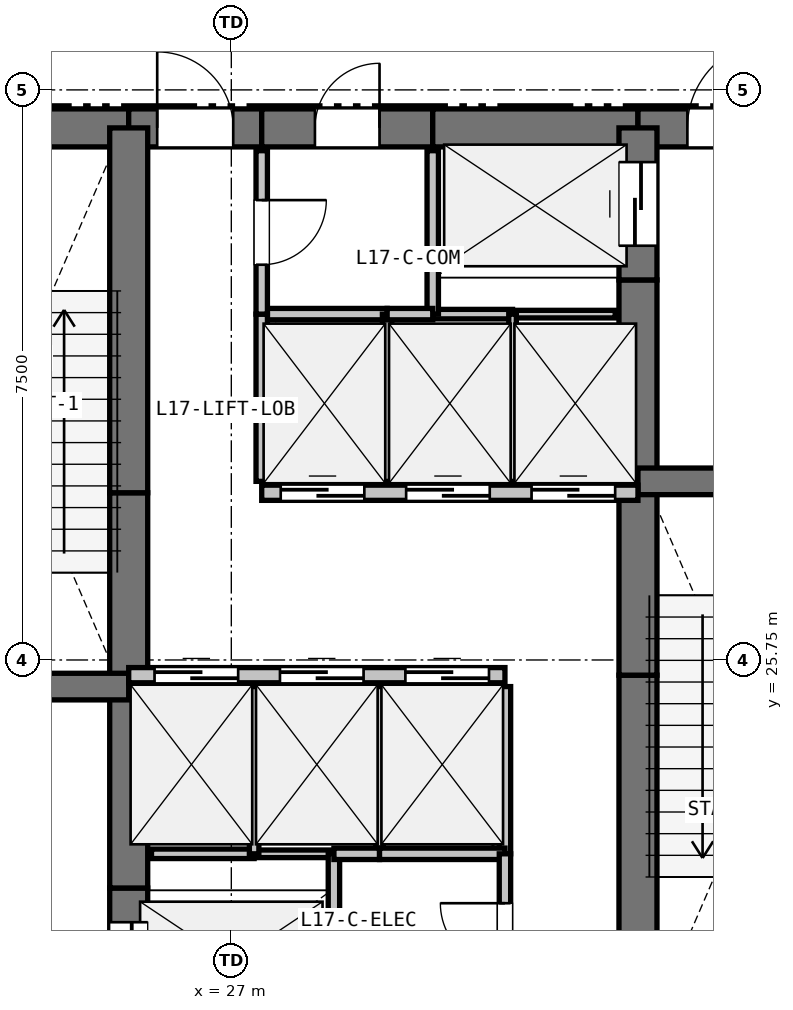
"""IFC4 building model, lengths in metres.
Left out: names, types, materials, properties, quantities, classifications, styles, units other than length and angle.
Written with IfcOpenShell. Run it as: python <this file> out.ifc"""

import sys

from ifc_helpers import new_model, si_unit, direction, frame, frame_2d, origin, place, context, subcontext, project, spatial, rectangle, extrude, element, fill, save


model = new_model("IFC4")
c1 = context("Model", 3, precision=1e-05, world=origin(), true_north=direction((0.0, 1.0)))
c2 = subcontext(c1, "Body", "Model", "MODEL_VIEW")
j1 = project(units=[si_unit("LENGTHUNIT", "METRE"), si_unit("PLANEANGLEUNIT", "RADIAN")], contexts=[c1])
p1 = place(None, origin())
s1 = spatial("IfcSite", under=j1, at=p1, CompositionType="ELEMENT")
p2 = place(p1, origin())
s2 = spatial("IfcBuilding", under=s1, at=p2, CompositionType="ELEMENT")
p3 = place(p2, frame((0.0, 0.0, 62.1)))
s3 = spatial("IfcBuildingStorey", under=s2, at=p3, CompositionType="ELEMENT", Elevation=62.1)
p4 = place(p3, frame((22.2, 32.75, 0.0), z_axis=(0.0, 0.0, 1.0), x_axis=(1.0, 0.0, 0.0)))
e1 = element("IfcWall", 1, at=p4, inside=s3, PredefinedType="SHEAR", context=c2, shape_type="SweptSolid", body=[
    extrude(rectangle(XDim=3.45, YDim=0.5, at=frame_2d((1.725, 0.0))), origin(), (0.0, 0.0, 1.0), 4.48),
])
p5 = place(p3, frame((25.65, 32.75, 0.0), z_axis=(0.0, 0.0, 1.0), x_axis=(1.0, 0.0, 0.0)))
e2 = element("IfcWall", 2, at=p5, inside=s3, PredefinedType="SHEAR", context=c2, shape_type="SweptSolid", body=[
    extrude(rectangle(XDim=1.75, YDim=0.5, at=frame_2d((0.875, 0.0))), origin(), (0.0, 0.0, 1.0), 4.48),
])
p6 = place(p5, frame((0.375, 0.0, 0.0)))
e3 = element("IfcOpeningElement", 3, at=p6, cuts=e2, PredefinedType="OPENING", context=c2, shape_type="SweptSolid", body=[
    extrude(rectangle(XDim=1.0, YDim=2.15, at=frame_2d((0.5, 1.075))), frame((0.0, 0.26, 0.0), z_axis=(0.0, -1.0, 0.0), x_axis=(1.0, 0.0, 0.0)), (0.0, 0.0, 1.0), 0.52),
])
p7 = place(p3, frame((27.4, 32.75, 0.0), z_axis=(0.0, 0.0, 1.0), x_axis=(1.0, 0.0, 0.0)))
e4 = element("IfcWall", 4, at=p7, inside=s3, PredefinedType="SHEAR", context=c2, shape_type="SweptSolid", body=[
    extrude(rectangle(XDim=2.25, YDim=0.5, at=frame_2d((1.125, 0.0))), origin(), (0.0, 0.0, 1.0), 4.48),
])
p8 = place(p7, frame((0.7, 0.0, 0.0)))
e5 = element("IfcOpeningElement", 5, at=p8, cuts=e4, PredefinedType="OPENING", context=c2, shape_type="SweptSolid", body=[
    extrude(rectangle(XDim=0.85, YDim=2.1, at=frame_2d((0.425, 1.05))), frame((0.0, 0.26, 0.0), z_axis=(0.0, -1.0, 0.0), x_axis=(1.0, 0.0, 0.0)), (0.0, 0.0, 1.0), 0.52),
])
p9 = place(p3, frame((29.65, 32.75, 0.0), z_axis=(0.0, 0.0, 1.0), x_axis=(1.0, 0.0, 0.0)))
e6 = element("IfcWall", 6, at=p9, inside=s3, PredefinedType="SHEAR", context=c2, shape_type="SweptSolid", body=[
    extrude(rectangle(XDim=2.7, YDim=0.5, at=frame_2d((1.35, 0.0))), origin(), (0.0, 0.0, 1.0), 4.48),
])
p10 = place(p3, frame((32.35, 32.75, 0.0), z_axis=(0.0, 0.0, 1.0), x_axis=(1.0, 0.0, 0.0)))
e7 = element("IfcWall", 7, at=p10, inside=s3, PredefinedType="SHEAR", context=c2, shape_type="SweptSolid", body=[
    extrude(rectangle(XDim=3.45, YDim=0.5, at=frame_2d((1.725, 0.0))), origin(), (0.0, 0.0, 1.0), 4.48),
])
p11 = place(p10, frame((0.65, 0.0, 0.0)))
e8 = element("IfcOpeningElement", 8, at=p11, cuts=e7, PredefinedType="OPENING", context=c2, shape_type="SweptSolid", body=[
    extrude(rectangle(XDim=1.15, YDim=2.15, at=frame_2d((0.575, 1.075))), frame((0.0, 0.26, 0.0), z_axis=(0.0, -1.0, 0.0), x_axis=(1.0, 0.0, 0.0)), (0.0, 0.0, 1.0), 0.52),
])
p12 = place(p3, frame((25.65, 20.75, 0.0), z_axis=(0.0, 0.0, 1.0), x_axis=(0.0, 1.0, 0.0)))
e9 = element("IfcWall", 9, at=p12, inside=s3, PredefinedType="SHEAR", context=c2, shape_type="SweptSolid", body=[
    extrude(rectangle(XDim=2.0, YDim=0.5, at=frame_2d((1.0, 0.0))), origin(), (0.0, 0.0, 1.0), 4.48),
])
p13 = place(p12, frame((0.45, 0.0, 0.0)))
e10 = element("IfcOpeningElement", 10, at=p13, cuts=e9, PredefinedType="OPENING", context=c2, shape_type="SweptSolid", body=[
    extrude(rectangle(XDim=1.1, YDim=2.15, at=frame_2d((0.55, 1.075))), frame((0.0, 0.26, 0.0), z_axis=(0.0, -1.0, 0.0), x_axis=(1.0, 0.0, 0.0)), (0.0, 0.0, 1.0), 0.52),
])
p14 = place(p3, frame((25.65, 22.75, 0.0), z_axis=(0.0, 0.0, 1.0), x_axis=(0.0, 1.0, 0.0)))
e11 = element("IfcWall", 11, at=p14, inside=s3, PredefinedType="SHEAR", context=c2, shape_type="SweptSolid", body=[
    extrude(rectangle(XDim=2.8, YDim=0.5, at=frame_2d((1.4, 0.0))), origin(), (0.0, 0.0, 1.0), 4.48),
])
p15 = place(p3, frame((25.65, 25.55, 0.0), z_axis=(0.0, 0.0, 1.0), x_axis=(0.0, 1.0, 0.0)))
e12 = element("IfcWall", 12, at=p15, inside=s3, PredefinedType="SHEAR", context=c2, shape_type="SweptSolid", body=[
    extrude(rectangle(XDim=2.4, YDim=0.5, at=frame_2d((1.2, 0.0))), origin(), (0.0, 0.0, 1.0), 4.48),
])
for number, where, z_axis, x_axis in (
    (13, (25.65, 27.95, 0.0), (0.0, 0.0, 1.0), (0.0, 1.0, 0.0)),
    (14, (32.35, 20.75, 0.0), (0.0, 0.0, 1.0), (0.0, 1.0, 0.0)),
):
    element("IfcWall", number, at=place(p3, frame(where, z_axis=z_axis, x_axis=x_axis)), inside=s3, PredefinedType="SHEAR", context=c2, shape_type="SweptSolid", body=[
        extrude(rectangle(XDim=4.8, YDim=0.5, at=frame_2d((2.4, 0.0))), origin(), (0.0, 0.0, 1.0), 4.48),
    ])
p16 = place(p3, frame((32.35, 25.55, 0.0), z_axis=(0.0, 0.0, 1.0), x_axis=(0.0, 1.0, 0.0)))
e15 = element("IfcWall", 15, at=p16, inside=s3, PredefinedType="SHEAR", context=c2, shape_type="SweptSolid", body=[
    extrude(rectangle(XDim=2.4, YDim=0.5, at=frame_2d((1.2, 0.0))), origin(), (0.0, 0.0, 1.0), 4.48),
])
p17 = place(p3, frame((32.35, 27.95, 0.0), z_axis=(0.0, 0.0, 1.0), x_axis=(0.0, 1.0, 0.0)))
e16 = element("IfcWall", 16, at=p17, inside=s3, PredefinedType="SHEAR", context=c2, shape_type="SweptSolid", body=[
    extrude(rectangle(XDim=2.8, YDim=0.5, at=frame_2d((1.4, 0.0))), origin(), (0.0, 0.0, 1.0), 4.48),
])
p18 = place(p3, frame((32.35, 30.75, 0.0), z_axis=(0.0, 0.0, 1.0), x_axis=(0.0, 1.0, 0.0)))
e17 = element("IfcWall", 17, at=p18, inside=s3, PredefinedType="SHEAR", context=c2, shape_type="SweptSolid", body=[
    extrude(rectangle(XDim=2.0, YDim=0.5, at=frame_2d((1.0, 0.0))), origin(), (0.0, 0.0, 1.0), 4.48),
])
p19 = place(p18, frame((0.45, 0.0, 0.0)))
e18 = element("IfcOpeningElement", 18, at=p19, cuts=e17, PredefinedType="OPENING", context=c2, shape_type="SweptSolid", body=[
    extrude(rectangle(XDim=1.1, YDim=2.15, at=frame_2d((0.55, 1.075))), frame((0.0, 0.26, 0.0), z_axis=(0.0, -1.0, 0.0), x_axis=(1.0, 0.0, 0.0)), (0.0, 0.0, 1.0), 0.52),
])
p20 = place(p3, frame((22.2, 25.4, 0.0), z_axis=(0.0, 0.0, 1.0), x_axis=(1.0, 0.0, 0.0)))
e19 = element("IfcWall", 19, at=p20, inside=s3, PredefinedType="SHEAR", context=c2, shape_type="SweptSolid", body=[
    extrude(rectangle(XDim=3.45, YDim=0.35, at=frame_2d((1.725, 0.0))), origin(), (0.0, 0.0, 1.0), 4.48),
])
p21 = place(p20, frame((1.15, 0.0, 0.0)))
e20 = element("IfcOpeningElement", 20, at=p21, cuts=e19, PredefinedType="OPENING", context=c2, shape_type="SweptSolid", body=[
    extrude(rectangle(XDim=1.15, YDim=2.15, at=frame_2d((0.575, 1.075))), frame((0.0, 0.185, 0.0), z_axis=(0.0, -1.0, 0.0), x_axis=(1.0, 0.0, 0.0)), (0.0, 0.0, 1.0), 0.37),
])
p22 = place(p3, frame((32.35, 28.1, 0.0), z_axis=(0.0, 0.0, 1.0), x_axis=(1.0, 0.0, 0.0)))
e21 = element("IfcWall", 21, at=p22, inside=s3, PredefinedType="SHEAR", context=c2, shape_type="SweptSolid", body=[
    extrude(rectangle(XDim=3.45, YDim=0.35, at=frame_2d((1.725, 0.0))), origin(), (0.0, 0.0, 1.0), 4.48),
])
p23 = place(p22, frame((1.15, 0.0, 0.0)))
e22 = element("IfcOpeningElement", 22, at=p23, cuts=e21, PredefinedType="OPENING", context=c2, shape_type="SweptSolid", body=[
    extrude(rectangle(XDim=1.15, YDim=2.15, at=frame_2d((0.575, 1.075))), frame((0.0, 0.185, 0.0), z_axis=(0.0, -1.0, 0.0), x_axis=(1.0, 0.0, 0.0)), (0.0, 0.0, 1.0), 0.37),
])
p24 = place(p3, frame((25.65, 25.55, 0.0), z_axis=(0.0, 0.0, 1.0), x_axis=(1.0, 0.0, 0.0)))
e23 = element("IfcWall", 23, at=p24, inside=s3, PredefinedType="PARTITIONING", context=c2, shape_type="SweptSolid", body=[
    extrude(rectangle(XDim=4.95, YDim=0.2, at=frame_2d((2.475, 0.0))), origin(), (0.0, 0.0, 1.0), 4.48),
])
p25 = place(p24, frame((0.34, 0.0, 0.0)))
e24 = element("IfcOpeningElement", 24, at=p25, cuts=e23, PredefinedType="OPENING", context=c2, shape_type="SweptSolid", body=[
    extrude(rectangle(XDim=1.1, YDim=2.15, at=frame_2d((0.55, 1.075))), frame((0.0, 0.11, 0.0), z_axis=(0.0, -1.0, 0.0), x_axis=(1.0, 0.0, 0.0)), (0.0, 0.0, 1.0), 0.22),
])
p26 = place(p24, frame((1.99, 0.0, 0.0)))
e25 = element("IfcOpeningElement", 25, at=p26, cuts=e23, PredefinedType="OPENING", context=c2, shape_type="SweptSolid", body=[
    extrude(rectangle(XDim=1.1, YDim=2.15, at=frame_2d((0.55, 1.075))), frame((0.0, 0.11, 0.0), z_axis=(0.0, -1.0, 0.0), x_axis=(1.0, 0.0, 0.0)), (0.0, 0.0, 1.0), 0.22),
])
p27 = place(p24, frame((3.64, 0.0, 0.0)))
e26 = element("IfcOpeningElement", 26, at=p27, cuts=e23, PredefinedType="OPENING", context=c2, shape_type="SweptSolid", body=[
    extrude(rectangle(XDim=1.1, YDim=2.15, at=frame_2d((0.55, 1.075))), frame((0.0, 0.11, 0.0), z_axis=(0.0, -1.0, 0.0), x_axis=(1.0, 0.0, 0.0)), (0.0, 0.0, 1.0), 0.22),
])
p28 = place(p3, frame((27.4, 27.95, 0.0), z_axis=(0.0, 0.0, 1.0), x_axis=(1.0, 0.0, 0.0)))
e27 = element("IfcWall", 27, at=p28, inside=s3, PredefinedType="PARTITIONING", context=c2, shape_type="SweptSolid", body=[
    extrude(rectangle(XDim=4.95, YDim=0.2, at=frame_2d((2.475, 0.0))), origin(), (0.0, 0.0, 1.0), 4.48),
])
p29 = place(p28, frame((0.25, 0.0, 0.0)))
e28 = element("IfcOpeningElement", 28, at=p29, cuts=e27, PredefinedType="OPENING", context=c2, shape_type="SweptSolid", body=[
    extrude(rectangle(XDim=1.1, YDim=2.15, at=frame_2d((0.55, 1.075))), frame((0.0, 0.11, 0.0), z_axis=(0.0, -1.0, 0.0), x_axis=(1.0, 0.0, 0.0)), (0.0, 0.0, 1.0), 0.22),
])
p30 = place(p28, frame((1.9, 0.0, 0.0)))
e29 = element("IfcOpeningElement", 29, at=p30, cuts=e27, PredefinedType="OPENING", context=c2, shape_type="SweptSolid", body=[
    extrude(rectangle(XDim=1.1, YDim=2.15, at=frame_2d((0.55, 1.075))), frame((0.0, 0.11, 0.0), z_axis=(0.0, -1.0, 0.0), x_axis=(1.0, 0.0, 0.0)), (0.0, 0.0, 1.0), 0.22),
])
p31 = place(p28, frame((3.55, 0.0, 0.0)))
e30 = element("IfcOpeningElement", 30, at=p31, cuts=e27, PredefinedType="OPENING", context=c2, shape_type="SweptSolid", body=[
    extrude(rectangle(XDim=1.1, YDim=2.15, at=frame_2d((0.55, 1.075))), frame((0.0, 0.11, 0.0), z_axis=(0.0, -1.0, 0.0), x_axis=(1.0, 0.0, 0.0)), (0.0, 0.0, 1.0), 0.22),
])
p32 = place(p3, frame((25.95, 23.2, 0.0), z_axis=(0.0, 0.0, 1.0), x_axis=(1.0, 0.0, 0.0)))
e31 = element("IfcWall", 31, at=p32, inside=s3, PredefinedType="PARTITIONING", context=c2, shape_type="SweptSolid", body=[
    extrude(rectangle(XDim=1.35, YDim=0.125, at=frame_2d((0.675, 0.0))), origin(), (0.0, 0.0, 1.0), 4.48),
])
p33 = place(p3, frame((27.3, 23.2, 0.0), z_axis=(0.0, 0.0, 1.0), x_axis=(1.0, 0.0, 0.0)))
e32 = element("IfcWall", 32, at=p33, inside=s3, PredefinedType="PARTITIONING", context=c2, shape_type="SweptSolid", body=[
    extrude(rectangle(XDim=1.05, YDim=0.1, at=frame_2d((0.525, 0.0))), origin(), (0.0, 0.0, 1.0), 4.48),
])
p34 = place(p3, frame((28.35, 23.2, 0.0), z_axis=(0.0, 0.0, 1.0), x_axis=(0.0, -1.0, 0.0)))
e33 = element("IfcWall", 33, at=p34, inside=s3, PredefinedType="PARTITIONING", context=c2, shape_type="SweptSolid", body=[
    extrude(rectangle(XDim=2.15, YDim=0.15, at=frame_2d((1.075, 0.0))), origin(), (0.0, 0.0, 1.0), 4.48),
])
p35 = place(p3, frame((32.05, 30.3, 0.0), z_axis=(0.0, 0.0, 1.0), x_axis=(-1.0, 0.0, 0.0)))
e34 = element("IfcWall", 34, at=p35, inside=s3, PredefinedType="PARTITIONING", context=c2, shape_type="SweptSolid", body=[
    extrude(rectangle(XDim=1.35, YDim=0.1, at=frame_2d((0.675, 0.0))), origin(), (0.0, 0.0, 1.0), 4.48),
])
p36 = place(p3, frame((30.7, 30.3, 0.0), z_axis=(0.0, 0.0, 1.0), x_axis=(-1.0, 0.0, 0.0)))
e35 = element("IfcWall", 35, at=p36, inside=s3, PredefinedType="PARTITIONING", context=c2, shape_type="SweptSolid", body=[
    extrude(rectangle(XDim=1.05, YDim=0.125, at=frame_2d((0.525, 0.0))), origin(), (0.0, 0.0, 1.0), 4.48),
])
p37 = place(p3, frame((29.65, 30.3, 0.0), z_axis=(0.0, 0.0, 1.0), x_axis=(0.0, 1.0, 0.0)))
e36 = element("IfcWall", 36, at=p37, inside=s3, PredefinedType="PARTITIONING", context=c2, shape_type="SweptSolid", body=[
    extrude(rectangle(XDim=2.15, YDim=0.15, at=frame_2d((1.075, 0.0))), origin(), (0.0, 0.0, 1.0), 4.48),
])
p38 = place(p3, frame((27.3, 25.4, 0.0), z_axis=(0.0, 0.0, 1.0), x_axis=(0.0, -1.0, 0.0)))
e37 = element("IfcWall", 37, at=p38, inside=s3, PredefinedType="PARTITIONING", context=c2, shape_type="SweptSolid", body=[
    extrude(rectangle(XDim=2.2, YDim=0.125, at=frame_2d((1.1, 0.0))), origin(), (0.0, 0.0, 1.0), 4.48),
])
p39 = place(p3, frame((28.95, 25.4, 0.0), z_axis=(0.0, 0.0, 1.0), x_axis=(0.0, -1.0, 0.0)))
e38 = element("IfcWall", 38, at=p39, inside=s3, PredefinedType="PARTITIONING", context=c2, shape_type="SweptSolid", body=[
    extrude(rectangle(XDim=2.2, YDim=0.1, at=frame_2d((1.1, 0.0))), origin(), (0.0, 0.0, 1.0), 4.48),
])
p40 = place(p3, frame((28.95, 23.2, 0.0), z_axis=(0.0, 0.0, 1.0), x_axis=(-1.0, 0.0, 0.0)))
e39 = element("IfcWall", 39, at=p40, inside=s3, PredefinedType="PARTITIONING", context=c2, shape_type="SweptSolid", body=[
    extrude(rectangle(XDim=0.6, YDim=0.15, at=frame_2d((0.3, 0.0))), origin(), (0.0, 0.0, 1.0), 4.48),
])
p41 = place(p3, frame((30.6, 25.4, 0.0), z_axis=(0.0, 0.0, 1.0), x_axis=(0.0, -1.0, 0.0)))
e40 = element("IfcWall", 40, at=p41, inside=s3, PredefinedType="PARTITIONING", context=c2, shape_type="SweptSolid", body=[
    extrude(rectangle(XDim=2.2, YDim=0.15, at=frame_2d((1.1, 0.0))), origin(), (0.0, 0.0, 1.0), 4.48),
])
for number, where, z_axis, x_axis in (
    (41, (30.6, 23.2, 0.0), (0.0, 0.0, 1.0), (-1.0, 0.0, 0.0)),
    (42, (27.4, 30.3, 0.0), (0.0, 0.0, 1.0), (1.0, 0.0, 0.0)),
):
    element("IfcWall", number, at=place(p3, frame(where, z_axis=z_axis, x_axis=x_axis)), inside=s3, PredefinedType="PARTITIONING", context=c2, shape_type="SweptSolid", body=[
        extrude(rectangle(XDim=1.65, YDim=0.15, at=frame_2d((0.825, 0.0))), origin(), (0.0, 0.0, 1.0), 4.48),
    ])
p42 = place(p3, frame((29.05, 30.3, 0.0), z_axis=(0.0, 0.0, 1.0), x_axis=(0.0, -1.0, 0.0)))
e43 = element("IfcWall", 43, at=p42, inside=s3, PredefinedType="PARTITIONING", context=c2, shape_type="SweptSolid", body=[
    extrude(rectangle(XDim=2.2, YDim=0.125, at=frame_2d((1.1, 0.0))), origin(), (0.0, 0.0, 1.0), 4.48),
])
p43 = place(p3, frame((27.4, 28.1, 0.0), z_axis=(0.0, 0.0, 1.0), x_axis=(0.0, 1.0, 0.0)))
e44 = element("IfcWall", 44, at=p43, inside=s3, PredefinedType="PARTITIONING", context=c2, shape_type="SweptSolid", body=[
    extrude(rectangle(XDim=2.2, YDim=0.15, at=frame_2d((1.1, 0.0))), origin(), (0.0, 0.0, 1.0), 4.48),
])
p44 = place(p3, frame((29.05, 30.3, 0.0), z_axis=(0.0, 0.0, 1.0), x_axis=(1.0, 0.0, 0.0)))
e45 = element("IfcWall", 45, at=p44, inside=s3, PredefinedType="PARTITIONING", context=c2, shape_type="SweptSolid", body=[
    extrude(rectangle(XDim=0.6, YDim=0.15, at=frame_2d((0.3, 0.0))), origin(), (0.0, 0.0, 1.0), 4.48),
])
p45 = place(p3, frame((30.7, 30.3, 0.0), z_axis=(0.0, 0.0, 1.0), x_axis=(0.0, -1.0, 0.0)))
e46 = element("IfcWall", 46, at=p45, inside=s3, PredefinedType="PARTITIONING", context=c2, shape_type="SweptSolid", body=[
    extrude(rectangle(XDim=2.2, YDim=0.1, at=frame_2d((1.1, 0.0))), origin(), (0.0, 0.0, 1.0), 4.48),
])
p46 = place(p3, frame((30.6, 21.05, 0.0), z_axis=(0.0, 0.0, 1.0), x_axis=(0.0, 1.0, 0.0)))
e47 = element("IfcWall", 47, at=p46, inside=s3, PredefinedType="PARTITIONING", context=c2, shape_type="SweptSolid", body=[
    extrude(rectangle(XDim=2.15, YDim=0.15, at=frame_2d((1.075, 0.0))), origin(), (0.0, 0.0, 1.0), 4.48),
])
p47 = place(p46, frame((0.65, 0.0, 0.0)))
e48 = element("IfcOpeningElement", 48, at=p47, cuts=e47, PredefinedType="OPENING", context=c2, shape_type="SweptSolid", body=[
    extrude(rectangle(XDim=0.85, YDim=2.1, at=frame_2d((0.425, 1.05))), frame((0.0, 0.085, 0.0), z_axis=(0.0, -1.0, 0.0), x_axis=(1.0, 0.0, 0.0)), (0.0, 0.0, 1.0), 0.17),
])
p48 = place(p3, frame((27.4, 32.45, 0.0), z_axis=(0.0, 0.0, 1.0), x_axis=(0.0, -1.0, 0.0)))
e49 = element("IfcWall", 49, at=p48, inside=s3, PredefinedType="PARTITIONING", context=c2, shape_type="SweptSolid", body=[
    extrude(rectangle(XDim=2.15, YDim=0.15, at=frame_2d((1.075, 0.0))), origin(), (0.0, 0.0, 1.0), 4.48),
])
p49 = place(p48, frame((0.65, 0.0, 0.0)))
e50 = element("IfcOpeningElement", 50, at=p49, cuts=e49, PredefinedType="OPENING", context=c2, shape_type="SweptSolid", body=[
    extrude(rectangle(XDim=0.85, YDim=2.1, at=frame_2d((0.425, 1.05))), frame((0.0, 0.085, 0.0), z_axis=(0.0, -1.0, 0.0), x_axis=(1.0, 0.0, 0.0)), (0.0, 0.0, 1.0), 0.17),
])
p50 = place(p25, origin())
e51 = element("IfcDoor", 51, at=p50, inside=s3, OperationType="SLIDING_TO_LEFT", PredefinedType="DOOR", context=c2, shape_type="SweptSolid", body=[
    extrude(rectangle(XDim=1.1, YDim=2.15, at=frame_2d((0.55, 1.075))), frame((0.0, 0.025, 0.0), z_axis=(0.0, -1.0, 0.0), x_axis=(1.0, 0.0, 0.0)), (0.0, 0.0, 1.0), 0.05),
])
fill(e24, e51)
p51 = place(p26, origin())
e52 = element("IfcDoor", 52, at=p51, inside=s3, OperationType="SLIDING_TO_LEFT", PredefinedType="DOOR", context=c2, shape_type="SweptSolid", body=[
    extrude(rectangle(XDim=1.1, YDim=2.15, at=frame_2d((0.55, 1.075))), frame((0.0, 0.025, 0.0), z_axis=(0.0, -1.0, 0.0), x_axis=(1.0, 0.0, 0.0)), (0.0, 0.0, 1.0), 0.05),
])
fill(e25, e52)
p52 = place(p27, origin())
e53 = element("IfcDoor", 53, at=p52, inside=s3, OperationType="SLIDING_TO_LEFT", PredefinedType="DOOR", context=c2, shape_type="SweptSolid", body=[
    extrude(rectangle(XDim=1.1, YDim=2.15, at=frame_2d((0.55, 1.075))), frame((0.0, 0.025, 0.0), z_axis=(0.0, -1.0, 0.0), x_axis=(1.0, 0.0, 0.0)), (0.0, 0.0, 1.0), 0.05),
])
fill(e26, e53)
p53 = place(p29, origin())
e54 = element("IfcDoor", 54, at=p53, inside=s3, OperationType="SLIDING_TO_LEFT", PredefinedType="DOOR", context=c2, shape_type="SweptSolid", body=[
    extrude(rectangle(XDim=1.1, YDim=2.15, at=frame_2d((0.55, 1.075))), frame((0.0, 0.025, 0.0), z_axis=(0.0, -1.0, 0.0), x_axis=(1.0, 0.0, 0.0)), (0.0, 0.0, 1.0), 0.05),
])
fill(e28, e54)
p54 = place(p30, origin())
e55 = element("IfcDoor", 55, at=p54, inside=s3, OperationType="SLIDING_TO_LEFT", PredefinedType="DOOR", context=c2, shape_type="SweptSolid", body=[
    extrude(rectangle(XDim=1.1, YDim=2.15, at=frame_2d((0.55, 1.075))), frame((0.0, 0.025, 0.0), z_axis=(0.0, -1.0, 0.0), x_axis=(1.0, 0.0, 0.0)), (0.0, 0.0, 1.0), 0.05),
])
fill(e29, e55)
p55 = place(p31, origin())
e56 = element("IfcDoor", 56, at=p55, inside=s3, OperationType="SLIDING_TO_LEFT", PredefinedType="DOOR", context=c2, shape_type="SweptSolid", body=[
    extrude(rectangle(XDim=1.1, YDim=2.15, at=frame_2d((0.55, 1.075))), frame((0.0, 0.025, 0.0), z_axis=(0.0, -1.0, 0.0), x_axis=(1.0, 0.0, 0.0)), (0.0, 0.0, 1.0), 0.05),
])
fill(e30, e56)
p56 = place(p6, origin())
e57 = element("IfcDoor", 57, at=p56, inside=s3, OperationType="SINGLE_SWING_LEFT", PredefinedType="DOOR", context=c2, shape_type="SweptSolid", body=[
    extrude(rectangle(XDim=1.0, YDim=2.15, at=frame_2d((0.5, 1.075))), frame((0.0, 0.025, 0.0), z_axis=(0.0, -1.0, 0.0), x_axis=(1.0, 0.0, 0.0)), (0.0, 0.0, 1.0), 0.05),
])
fill(e3, e57)
p57 = place(p13, origin())
e58 = element("IfcDoor", 58, at=p57, inside=s3, OperationType="SLIDING_TO_LEFT", PredefinedType="DOOR", context=c2, shape_type="SweptSolid", body=[
    extrude(rectangle(XDim=1.1, YDim=2.15, at=frame_2d((0.55, 1.075))), frame((0.0, 0.025, 0.0), z_axis=(0.0, -1.0, 0.0), x_axis=(1.0, 0.0, 0.0)), (0.0, 0.0, 1.0), 0.05),
])
fill(e10, e58)
p58 = place(p19, origin())
e59 = element("IfcDoor", 59, at=p58, inside=s3, OperationType="SLIDING_TO_LEFT", PredefinedType="DOOR", context=c2, shape_type="SweptSolid", body=[
    extrude(rectangle(XDim=1.1, YDim=2.15, at=frame_2d((0.55, 1.075))), frame((0.0, 0.025, 0.0), z_axis=(0.0, -1.0, 0.0), x_axis=(1.0, 0.0, 0.0)), (0.0, 0.0, 1.0), 0.05),
])
fill(e18, e59)
p59 = place(p11, origin())
e60 = element("IfcDoor", 60, at=p59, inside=s3, OperationType="SINGLE_SWING_RIGHT", PredefinedType="DOOR", context=c2, shape_type="SweptSolid", body=[
    extrude(rectangle(XDim=1.15, YDim=2.15, at=frame_2d((0.575, 1.075))), frame((0.0, 0.025, 0.0), z_axis=(0.0, -1.0, 0.0), x_axis=(1.0, 0.0, 0.0)), (0.0, 0.0, 1.0), 0.05),
])
fill(e8, e60)
p60 = place(p47, origin())
e61 = element("IfcDoor", 61, at=p60, inside=s3, OperationType="SINGLE_SWING_RIGHT", PredefinedType="DOOR", context=c2, shape_type="SweptSolid", body=[
    extrude(rectangle(XDim=0.85, YDim=2.1, at=frame_2d((0.425, 1.05))), frame((0.0, 0.025, 0.0), z_axis=(0.0, -1.0, 0.0), x_axis=(1.0, 0.0, 0.0)), (0.0, 0.0, 1.0), 0.05),
])
fill(e48, e61)
p61 = place(p49, origin())
e62 = element("IfcDoor", 62, at=p61, inside=s3, OperationType="SINGLE_SWING_LEFT", PredefinedType="DOOR", context=c2, shape_type="SweptSolid", body=[
    extrude(rectangle(XDim=0.85, YDim=2.1, at=frame_2d((0.425, 1.05))), frame((0.0, 0.025, 0.0), z_axis=(0.0, -1.0, 0.0), x_axis=(1.0, 0.0, 0.0)), (0.0, 0.0, 1.0), 0.05),
])
fill(e50, e62)
p62 = place(p8, origin())
e63 = element("IfcDoor", 63, at=p62, inside=s3, OperationType="SINGLE_SWING_RIGHT", PredefinedType="DOOR", context=c2, shape_type="SweptSolid", body=[
    extrude(rectangle(XDim=0.85, YDim=2.1, at=frame_2d((0.425, 1.05))), frame((0.0, 0.025, 0.0), z_axis=(0.0, -1.0, 0.0), x_axis=(1.0, 0.0, 0.0)), (0.0, 0.0, 1.0), 0.05),
])
fill(e5, e63)
save(model, sys.argv[1])
